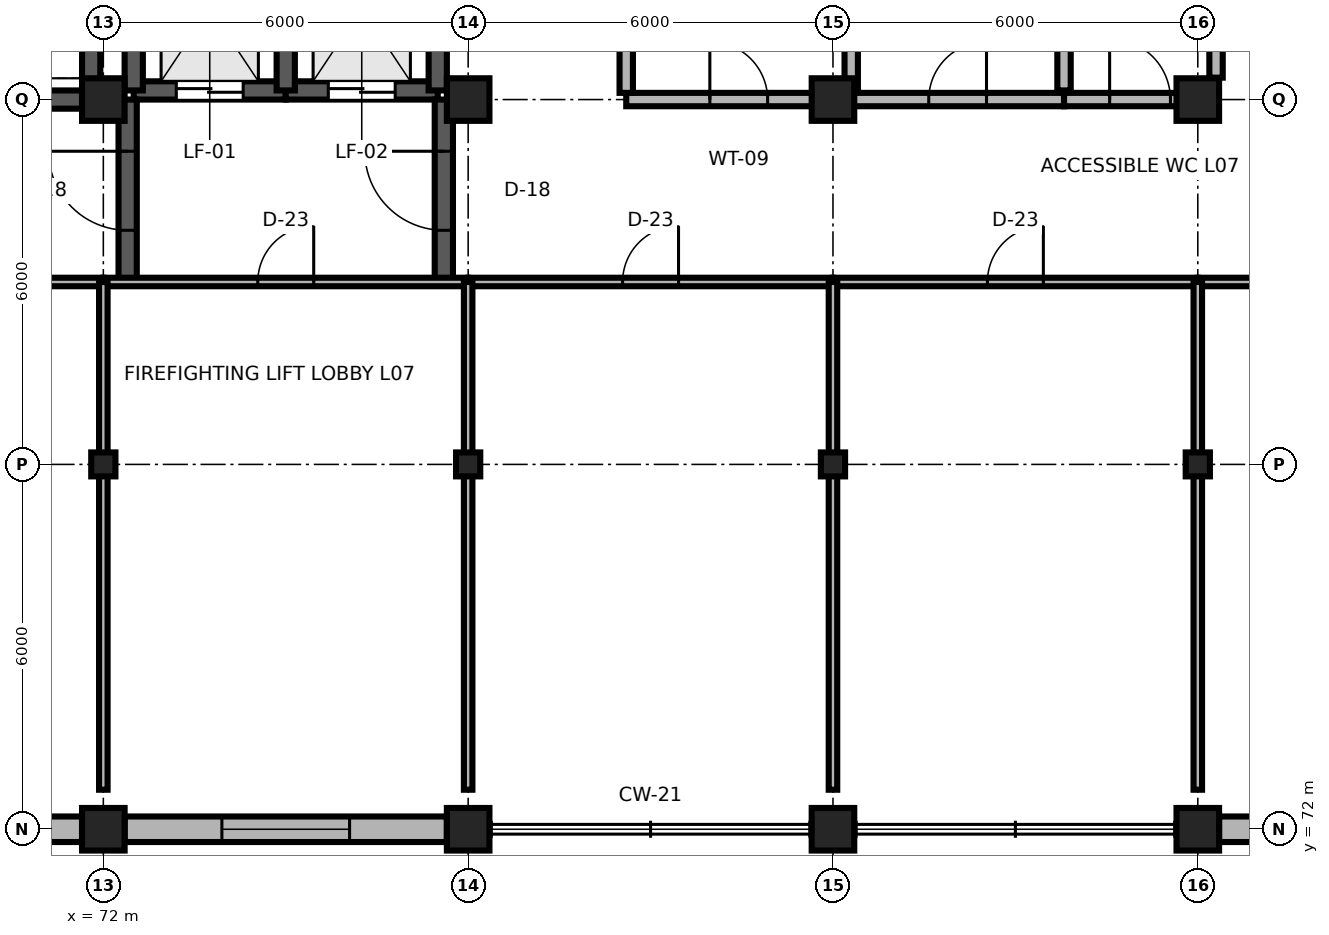
"""IFC4 building model, lengths in metres.
Left out: names, types, materials, properties, quantities, classifications, styles, units other than length and angle.
Written with IfcOpenShell. Run it as: python <this file> out.ifc"""

import sys

from ifc_helpers import new_model, si_unit, direction, frame, frame_2d, origin, origin_2d, place, context, subcontext, project, spatial, rectangle, i_section, extrude, element, fill, save


model = new_model("IFC4")
c1 = context("Model", 3, precision=1e-05, world=origin(), true_north=direction((0.0, 1.0)))
c2 = subcontext(c1, "Body", "Model", "MODEL_VIEW")
j1 = project(units=[si_unit("LENGTHUNIT", "METRE"), si_unit("PLANEANGLEUNIT", "RADIAN")], contexts=[c1])
p1 = place(None, origin())
s1 = spatial("IfcSite", under=j1, at=p1, CompositionType="ELEMENT")
p2 = place(p1, origin())
s2 = spatial("IfcBuilding", under=s1, at=p2, CompositionType="ELEMENT")
p3 = place(p2, frame((0.0, 0.0, 28.8)))
s3 = spatial("IfcBuildingStorey", under=s2, at=p3, CompositionType="ELEMENT", Elevation=28.8)
for number, where, z_axis, x_axis in (
    (1, (72.0, 72.0, 0.0), (0.0, 0.0, 1.0), (1.0, 0.0, 0.0)),
    (2, (78.0, 72.0, 0.0), (0.0, 0.0, 1.0), (1.0, 0.0, 0.0)),
    (3, (84.0, 72.0, 0.0), (0.0, 0.0, 1.0), (1.0, 0.0, 0.0)),
    (4, (90.0, 72.0, 0.0), (0.0, 0.0, 1.0), (1.0, 0.0, 0.0)),
):
    element("IfcColumn", number, at=place(p3, frame(where, z_axis=z_axis, x_axis=x_axis)), inside=s3, PredefinedType="COLUMN", context=c2, shape_type="SweptSolid", body=[
        extrude(rectangle(XDim=0.7, YDim=0.7, at=origin_2d()), origin(), (0.0, 0.0, 1.0), 3.9),
    ])
for number, where, z_axis, x_axis in (
    (5, (72.0, 78.0, 0.0), (0.0, 0.0, 1.0), (1.0, 0.0, 0.0)),
    (6, (78.0, 78.0, 0.0), (0.0, 0.0, 1.0), (1.0, 0.0, 0.0)),
    (7, (84.0, 78.0, 0.0), (0.0, 0.0, 1.0), (1.0, 0.0, 0.0)),
    (8, (90.0, 78.0, 0.0), (0.0, 0.0, 1.0), (1.0, 0.0, 0.0)),
):
    element("IfcColumn", number, at=place(p3, frame(where, z_axis=z_axis, x_axis=x_axis)), inside=s3, PredefinedType="COLUMN", context=c2, shape_type="SweptSolid", body=[
        extrude(i_section(OverallWidth=0.398, OverallDepth=0.394, WebThickness=0.011, FlangeThickness=0.018, FilletRadius=0.022, at=origin_2d()), origin(), (0.0, 0.0, 1.0), 3.9),
    ])
for number, where, z_axis, x_axis in (
    (9, (72.0, 84.0, 0.0), (0.0, 0.0, 1.0), (1.0, 0.0, 0.0)),
    (10, (78.0, 84.0, 0.0), (0.0, 0.0, 1.0), (1.0, 0.0, 0.0)),
    (11, (84.0, 84.0, 0.0), (0.0, 0.0, 1.0), (1.0, 0.0, 0.0)),
    (12, (90.0, 84.0, 0.0), (0.0, 0.0, 1.0), (1.0, 0.0, 0.0)),
):
    element("IfcColumn", number, at=place(p3, frame(where, z_axis=z_axis, x_axis=x_axis)), inside=s3, PredefinedType="COLUMN", context=c2, shape_type="SweptSolid", body=[
        extrude(rectangle(XDim=0.7, YDim=0.7, at=origin_2d()), origin(), (0.0, 0.0, 1.0), 3.9),
    ])
p4 = place(p3, frame((66.35, 72.0, 0.0), z_axis=(0.0, 0.0, 1.0), x_axis=(1.0, 0.0, 0.0)))
e13 = element("IfcWall", 13, at=p4, inside=s3, PredefinedType="SOLIDWALL", context=c2, shape_type="SweptSolid", body=[
    extrude(rectangle(XDim=5.3, YDim=0.42, at=frame_2d((2.65, 0.0))), origin(), (0.0, 0.0, 1.0), 3.32),
])
p5 = place(p4, frame((1.6, 0.0, 0.85)))
e14 = element("IfcOpeningElement", 14, at=p5, cuts=e13, PredefinedType="OPENING", context=c2, shape_type="SweptSolid", body=[
    extrude(rectangle(XDim=2.1, YDim=2.1, at=frame_2d((1.05, 1.05))), frame((0.0, 0.225, 0.0), z_axis=(0.0, -1.0, 0.0), x_axis=(1.0, 0.0, 0.0)), (0.0, 0.0, 1.0), 0.45),
])
p6 = place(p3, frame((72.35, 72.0, 0.0), z_axis=(0.0, 0.0, 1.0), x_axis=(1.0, 0.0, 0.0)))
e15 = element("IfcWall", 15, at=p6, inside=s3, PredefinedType="SOLIDWALL", context=c2, shape_type="SweptSolid", body=[
    extrude(rectangle(XDim=5.3, YDim=0.42, at=frame_2d((2.65, 0.0))), origin(), (0.0, 0.0, 1.0), 3.32),
])
p7 = place(p6, frame((1.6, 0.0, 0.85)))
e16 = element("IfcOpeningElement", 16, at=p7, cuts=e15, PredefinedType="OPENING", context=c2, shape_type="SweptSolid", body=[
    extrude(rectangle(XDim=2.1, YDim=2.1, at=frame_2d((1.05, 1.05))), frame((0.0, 0.225, 0.0), z_axis=(0.0, -1.0, 0.0), x_axis=(1.0, 0.0, 0.0)), (0.0, 0.0, 1.0), 0.45),
])
p8 = place(p3, frame((90.35, 72.0, 0.0), z_axis=(0.0, 0.0, 1.0), x_axis=(1.0, 0.0, 0.0)))
e17 = element("IfcWall", 17, at=p8, inside=s3, PredefinedType="SOLIDWALL", context=c2, shape_type="SweptSolid", body=[
    extrude(rectangle(XDim=5.3, YDim=0.42, at=frame_2d((2.65, 0.0))), origin(), (0.0, 0.0, 1.0), 3.32),
])
p9 = place(p8, frame((1.6, 0.0, 0.85)))
e18 = element("IfcOpeningElement", 18, at=p9, cuts=e17, PredefinedType="OPENING", context=c2, shape_type="SweptSolid", body=[
    extrude(rectangle(XDim=2.1, YDim=2.1, at=frame_2d((1.05, 1.05))), frame((0.0, 0.225, 0.0), z_axis=(0.0, -1.0, 0.0), x_axis=(1.0, 0.0, 0.0)), (0.0, 0.0, 1.0), 0.45),
])
p10 = place(p3, frame((66.35, 84.0, 0.0), z_axis=(0.0, 0.0, 1.0), x_axis=(1.0, 0.0, 0.0)))
e19 = element("IfcWall", 19, at=p10, inside=s3, PredefinedType="SHEAR", context=c2, shape_type="SweptSolid", body=[
    extrude(rectangle(XDim=5.3, YDim=0.3, at=frame_2d((2.65, 0.0))), origin(), (0.0, 0.0, 1.0), 3.66),
])
p11 = place(p10, frame((1.975, 0.0, 0.0)))
e20 = element("IfcOpeningElement", 20, at=p11, cuts=e19, PredefinedType="OPENING", context=c2, shape_type="SweptSolid", body=[
    extrude(rectangle(XDim=1.35, YDim=2.2, at=frame_2d((0.675, 1.1))), frame((0.0, 0.165, 0.0), z_axis=(0.0, -1.0, 0.0), x_axis=(1.0, 0.0, 0.0)), (0.0, 0.0, 1.0), 0.33),
])
p12 = place(p3, frame((71.8, 84.0, 0.0), z_axis=(0.0, 0.0, 1.0), x_axis=(0.0, 1.0, 0.0)))
e21 = element("IfcWall", 21, at=p12, inside=s3, PredefinedType="SHEAR", context=c2, shape_type="SweptSolid", body=[
    extrude(rectangle(XDim=11.8, YDim=0.3, at=frame_2d((5.9, 0.0))), origin(), (0.0, 0.0, 1.0), 3.74),
])
p13 = place(p3, frame((72.5, 84.15, 0.0), z_axis=(0.0, 0.0, 1.0), x_axis=(1.0, 0.0, 0.0)))
e22 = element("IfcWall", 22, at=p13, inside=s3, PredefinedType="SHEAR", context=c2, shape_type="SweptSolid", body=[
    extrude(rectangle(XDim=2.5, YDim=0.3, at=frame_2d((1.25, 0.0))), origin(), (0.0, 0.0, 1.0), 3.74),
])
p14 = place(p13, frame((0.7, 0.0, 0.0)))
e23 = element("IfcOpeningElement", 23, at=p14, cuts=e22, PredefinedType="OPENING", context=c2, shape_type="SweptSolid", body=[
    extrude(rectangle(XDim=1.1, YDim=2.1, at=frame_2d((0.55, 1.05))), frame((0.0, 0.165, 0.0), z_axis=(0.0, -1.0, 0.0), x_axis=(1.0, 0.0, 0.0)), (0.0, 0.0, 1.0), 0.33),
])
p15 = place(p3, frame((72.5, 84.15, 0.0), z_axis=(0.0, 0.0, 1.0), x_axis=(0.0, 1.0, 0.0)))
e24 = element("IfcWall", 24, at=p15, inside=s3, PredefinedType="SHEAR", context=c2, shape_type="SweptSolid", body=[
    extrude(rectangle(XDim=3.4, YDim=0.3, at=frame_2d((1.7, 0.0))), origin(), (0.0, 0.0, 1.0), 3.74),
])
p16 = place(p3, frame((75.0, 84.15, 0.0), z_axis=(0.0, 0.0, 1.0), x_axis=(1.0, 0.0, 0.0)))
e25 = element("IfcWall", 25, at=p16, inside=s3, PredefinedType="SHEAR", context=c2, shape_type="SweptSolid", body=[
    extrude(rectangle(XDim=2.5, YDim=0.3, at=frame_2d((1.25, 0.0))), origin(), (0.0, 0.0, 1.0), 3.74),
])
p17 = place(p16, frame((0.7, 0.0, 0.0)))
e26 = element("IfcOpeningElement", 26, at=p17, cuts=e25, PredefinedType="OPENING", context=c2, shape_type="SweptSolid", body=[
    extrude(rectangle(XDim=1.1, YDim=2.1, at=frame_2d((0.55, 1.05))), frame((0.0, 0.165, 0.0), z_axis=(0.0, -1.0, 0.0), x_axis=(1.0, 0.0, 0.0)), (0.0, 0.0, 1.0), 0.33),
])
for number, where, z_axis, x_axis in (
    (27, (75.0, 84.15, 0.0), (0.0, 0.0, 1.0), (0.0, 1.0, 0.0)),
    (28, (77.5, 84.15, 0.0), (0.0, 0.0, 1.0), (0.0, 1.0, 0.0)),
):
    element("IfcWall", number, at=place(p3, frame(where, z_axis=z_axis, x_axis=x_axis)), inside=s3, PredefinedType="SHEAR", context=c2, shape_type="SweptSolid", body=[
        extrude(rectangle(XDim=3.4, YDim=0.3, at=frame_2d((1.7, 0.0))), origin(), (0.0, 0.0, 1.0), 3.74),
    ])
p18 = place(p3, frame((72.4, 81.0, 0.0), z_axis=(0.0, 0.0, 1.0), x_axis=(0.0, 1.0, 0.0)))
e29 = element("IfcWall", 29, at=p18, inside=s3, PredefinedType="SHEAR", context=c2, shape_type="SweptSolid", body=[
    extrude(rectangle(XDim=3.0, YDim=0.3, at=frame_2d((1.5, 0.0))), origin(), (0.0, 0.0, 1.0), 3.74),
])
p19 = place(p18, frame((0.85, 0.0, 0.0)))
e30 = element("IfcOpeningElement", 30, at=p19, cuts=e29, PredefinedType="OPENING", context=c2, shape_type="SweptSolid", body=[
    extrude(rectangle(XDim=1.3, YDim=2.2, at=frame_2d((0.65, 1.1))), frame((0.0, 0.165, 0.0), z_axis=(0.0, -1.0, 0.0), x_axis=(1.0, 0.0, 0.0)), (0.0, 0.0, 1.0), 0.33),
])
p20 = place(p3, frame((77.6, 81.0, 0.0), z_axis=(0.0, 0.0, 1.0), x_axis=(0.0, 1.0, 0.0)))
e31 = element("IfcWall", 31, at=p20, inside=s3, PredefinedType="SHEAR", context=c2, shape_type="SweptSolid", body=[
    extrude(rectangle(XDim=3.0, YDim=0.3, at=frame_2d((1.5, 0.0))), origin(), (0.0, 0.0, 1.0), 3.74),
])
p21 = place(p20, frame((0.85, 0.0, 0.0)))
e32 = element("IfcOpeningElement", 32, at=p21, cuts=e31, PredefinedType="OPENING", context=c2, shape_type="SweptSolid", body=[
    extrude(rectangle(XDim=1.3, YDim=2.2, at=frame_2d((0.65, 1.1))), frame((0.0, 0.165, 0.0), z_axis=(0.0, -1.0, 0.0), x_axis=(1.0, 0.0, 0.0)), (0.0, 0.0, 1.0), 0.33),
])
p22 = place(p3, frame((80.6, 84.0, 0.0), z_axis=(0.0, 0.0, 1.0), x_axis=(1.0, 0.0, 0.0)))
e33 = element("IfcWall", 33, at=p22, inside=s3, PredefinedType="PARTITIONING", context=c2, shape_type="SweptSolid", body=[
    extrude(rectangle(XDim=3.7, YDim=0.22, at=frame_2d((1.85, 0.0))), origin(), (0.0, 0.0, 1.0), 3.352),
])
p23 = place(p22, frame((1.375, 0.0, 0.0)))
e34 = element("IfcOpeningElement", 34, at=p23, cuts=e33, PredefinedType="OPENING", context=c2, shape_type="SweptSolid", body=[
    extrude(rectangle(XDim=0.95, YDim=2.15, at=frame_2d((0.475, 1.075))), frame((0.0, 0.125, 0.0), z_axis=(0.0, -1.0, 0.0), x_axis=(1.0, 0.0, 0.0)), (0.0, 0.0, 1.0), 0.25),
])
p24 = place(p3, frame((84.3, 84.0, 0.0), z_axis=(0.0, 0.0, 1.0), x_axis=(1.0, 0.0, 0.0)))
e35 = element("IfcWall", 35, at=p24, inside=s3, PredefinedType="PARTITIONING", context=c2, shape_type="SweptSolid", body=[
    extrude(rectangle(XDim=3.5, YDim=0.22, at=frame_2d((1.75, 0.0))), origin(), (0.0, 0.0, 1.0), 3.352),
])
p25 = place(p24, frame((1.275, 0.0, 0.0)))
e36 = element("IfcOpeningElement", 36, at=p25, cuts=e35, PredefinedType="OPENING", context=c2, shape_type="SweptSolid", body=[
    extrude(rectangle(XDim=0.95, YDim=2.1, at=frame_2d((0.475, 1.05))), frame((0.0, 0.125, 0.0), z_axis=(0.0, -1.0, 0.0), x_axis=(1.0, 0.0, 0.0)), (0.0, 0.0, 1.0), 0.25),
])
p26 = place(p3, frame((87.8, 84.0, 0.0), z_axis=(0.0, 0.0, 1.0), x_axis=(1.0, 0.0, 0.0)))
e37 = element("IfcWall", 37, at=p26, inside=s3, PredefinedType="PARTITIONING", context=c2, shape_type="SweptSolid", body=[
    extrude(rectangle(XDim=2.5, YDim=0.22, at=frame_2d((1.25, 0.0))), origin(), (0.0, 0.0, 1.0), 3.352),
])
p27 = place(p26, frame((0.75, 0.0, 0.0)))
e38 = element("IfcOpeningElement", 38, at=p27, cuts=e37, PredefinedType="OPENING", context=c2, shape_type="SweptSolid", body=[
    extrude(rectangle(XDim=1.0, YDim=2.15, at=frame_2d((0.5, 1.075))), frame((0.0, 0.125, 0.0), z_axis=(0.0, -1.0, 0.0), x_axis=(1.0, 0.0, 0.0)), (0.0, 0.0, 1.0), 0.25),
])
for number, where, z_axis, x_axis in (
    (39, (84.3, 84.15, 0.0), (0.0, 0.0, 1.0), (0.0, 1.0, 0.0)),
    (40, (87.8, 84.15, 0.0), (0.0, 0.0, 1.0), (0.0, 1.0, 0.0)),
):
    element("IfcWall", number, at=place(p3, frame(where, z_axis=z_axis, x_axis=x_axis)), inside=s3, PredefinedType="PARTITIONING", context=c2, shape_type="SweptSolid", body=[
        extrude(rectangle(XDim=5.0, YDim=0.22, at=frame_2d((2.5, 0.0))), origin(), (0.0, 0.0, 1.0), 3.74),
    ])
p28 = place(p3, frame((66.0, 81.0, 0.0), z_axis=(0.0, 0.0, 1.0), x_axis=(1.0, 0.0, 0.0)))
e41 = element("IfcWall", 41, at=p28, inside=s3, PredefinedType="PARTITIONING", context=c2, shape_type="SweptSolid", body=[
    extrude(rectangle(XDim=6.0, YDim=0.14, at=frame_2d((3.0, 0.0))), origin(), (0.0, 0.0, 1.0), 3.74),
])
p29 = place(p28, frame((2.54, 0.0, 0.0)))
e42 = element("IfcOpeningElement", 42, at=p29, cuts=e41, PredefinedType="OPENING", context=c2, shape_type="SweptSolid", body=[
    extrude(rectangle(XDim=0.92, YDim=2.15, at=frame_2d((0.46, 1.075))), frame((0.0, 0.085, 0.0), z_axis=(0.0, -1.0, 0.0), x_axis=(1.0, 0.0, 0.0)), (0.0, 0.0, 1.0), 0.17),
])
p30 = place(p3, frame((72.0, 81.0, 0.0), z_axis=(0.0, 0.0, 1.0), x_axis=(1.0, 0.0, 0.0)))
e43 = element("IfcWall", 43, at=p30, inside=s3, PredefinedType="PARTITIONING", context=c2, shape_type="SweptSolid", body=[
    extrude(rectangle(XDim=6.0, YDim=0.14, at=frame_2d((3.0, 0.0))), origin(), (0.0, 0.0, 1.0), 3.74),
])
p31 = place(p30, frame((2.54, 0.0, 0.0)))
e44 = element("IfcOpeningElement", 44, at=p31, cuts=e43, PredefinedType="OPENING", context=c2, shape_type="SweptSolid", body=[
    extrude(rectangle(XDim=0.92, YDim=2.15, at=frame_2d((0.46, 1.075))), frame((0.0, 0.085, 0.0), z_axis=(0.0, -1.0, 0.0), x_axis=(1.0, 0.0, 0.0)), (0.0, 0.0, 1.0), 0.17),
])
p32 = place(p3, frame((78.0, 81.0, 0.0), z_axis=(0.0, 0.0, 1.0), x_axis=(1.0, 0.0, 0.0)))
e45 = element("IfcWall", 45, at=p32, inside=s3, PredefinedType="PARTITIONING", context=c2, shape_type="SweptSolid", body=[
    extrude(rectangle(XDim=6.0, YDim=0.14, at=frame_2d((3.0, 0.0))), origin(), (0.0, 0.0, 1.0), 3.74),
])
p33 = place(p32, frame((2.54, 0.0, 0.0)))
e46 = element("IfcOpeningElement", 46, at=p33, cuts=e45, PredefinedType="OPENING", context=c2, shape_type="SweptSolid", body=[
    extrude(rectangle(XDim=0.92, YDim=2.15, at=frame_2d((0.46, 1.075))), frame((0.0, 0.085, 0.0), z_axis=(0.0, -1.0, 0.0), x_axis=(1.0, 0.0, 0.0)), (0.0, 0.0, 1.0), 0.17),
])
p34 = place(p3, frame((84.0, 81.0, 0.0), z_axis=(0.0, 0.0, 1.0), x_axis=(1.0, 0.0, 0.0)))
e47 = element("IfcWall", 47, at=p34, inside=s3, PredefinedType="PARTITIONING", context=c2, shape_type="SweptSolid", body=[
    extrude(rectangle(XDim=6.0, YDim=0.14, at=frame_2d((3.0, 0.0))), origin(), (0.0, 0.0, 1.0), 3.74),
])
p35 = place(p34, frame((2.54, 0.0, 0.0)))
e48 = element("IfcOpeningElement", 48, at=p35, cuts=e47, PredefinedType="OPENING", context=c2, shape_type="SweptSolid", body=[
    extrude(rectangle(XDim=0.92, YDim=2.15, at=frame_2d((0.46, 1.075))), frame((0.0, 0.085, 0.0), z_axis=(0.0, -1.0, 0.0), x_axis=(1.0, 0.0, 0.0)), (0.0, 0.0, 1.0), 0.17),
])
p36 = place(p3, frame((90.0, 81.0, 0.0), z_axis=(0.0, 0.0, 1.0), x_axis=(1.0, 0.0, 0.0)))
e49 = element("IfcWall", 49, at=p36, inside=s3, PredefinedType="PARTITIONING", context=c2, shape_type="SweptSolid", body=[
    extrude(rectangle(XDim=6.0, YDim=0.14, at=frame_2d((3.0, 0.0))), origin(), (0.0, 0.0, 1.0), 3.74),
])
p37 = place(p36, frame((2.54, 0.0, 0.0)))
e50 = element("IfcOpeningElement", 50, at=p37, cuts=e49, PredefinedType="OPENING", context=c2, shape_type="SweptSolid", body=[
    extrude(rectangle(XDim=0.92, YDim=2.15, at=frame_2d((0.46, 1.075))), frame((0.0, 0.085, 0.0), z_axis=(0.0, -1.0, 0.0), x_axis=(1.0, 0.0, 0.0)), (0.0, 0.0, 1.0), 0.17),
])
for number, where, z_axis, x_axis in (
    (51, (72.0, 72.65, 0.0), (0.0, 0.0, 1.0), (0.0, 1.0, 0.0)),
    (52, (78.0, 72.65, 0.0), (0.0, 0.0, 1.0), (0.0, 1.0, 0.0)),
    (53, (84.0, 72.65, 0.0), (0.0, 0.0, 1.0), (0.0, 1.0, 0.0)),
    (54, (90.0, 72.65, 0.0), (0.0, 0.0, 1.0), (0.0, 1.0, 0.0)),
):
    element("IfcWall", number, at=place(p3, frame(where, z_axis=z_axis, x_axis=x_axis)), inside=s3, PredefinedType="PARTITIONING", context=c2, shape_type="SweptSolid", body=[
        extrude(rectangle(XDim=8.35, YDim=0.14, at=frame_2d((4.175, 0.0))), origin(), (0.0, 0.0, 1.0), 3.352),
    ])
p38 = place(p3, frame((80.6, 84.11, 0.0), z_axis=(0.0, 0.0, 1.0), x_axis=(0.0, 1.0, 0.0)))
e55 = element("IfcWall", 55, at=p38, inside=s3, PredefinedType="PARTITIONING", context=c2, shape_type="SweptSolid", body=[
    extrude(rectangle(XDim=4.98, YDim=0.22, at=frame_2d((2.49, 0.0))), origin(), (0.0, 0.0, 1.0), 3.74),
])
p39 = place(p3, frame((90.3, 84.36, 0.0), z_axis=(0.0, 0.0, 1.0), x_axis=(0.0, 1.0, 0.0)))
e56 = element("IfcWall", 56, at=p39, inside=s3, PredefinedType="PARTITIONING", context=c2, shape_type="SweptSolid", body=[
    extrude(rectangle(XDim=4.73, YDim=0.22, at=frame_2d((2.365, 0.0))), origin(), (0.0, 0.0, 1.0), 3.74),
])
p40 = place(p7, origin())
e57 = element("IfcWindow", 57, at=p40, inside=s3, PartitioningType="SINGLE_PANEL", PredefinedType="WINDOW", context=c2, shape_type="SweptSolid", body=[
    extrude(rectangle(XDim=2.1, YDim=2.1, at=frame_2d((1.05, 1.05))), frame((0.0, 0.03, 0.0), z_axis=(0.0, -1.0, 0.0), x_axis=(1.0, 0.0, 0.0)), (0.0, 0.0, 1.0), 0.06),
])
fill(e16, e57)
p41 = place(p14, origin())
e58 = element("IfcDoor", 58, at=p41, inside=s3, OperationType="DOUBLE_DOOR_SLIDING", PredefinedType="DOOR", context=c2, shape_type="SweptSolid", body=[
    extrude(rectangle(XDim=1.1, YDim=2.1, at=frame_2d((0.55, 1.05))), frame((0.0, 0.025, 0.0), z_axis=(0.0, -1.0, 0.0), x_axis=(1.0, 0.0, 0.0)), (0.0, 0.0, 1.0), 0.05),
])
fill(e23, e58)
p42 = place(p17, origin())
e59 = element("IfcDoor", 59, at=p42, inside=s3, OperationType="DOUBLE_DOOR_SLIDING", PredefinedType="DOOR", context=c2, shape_type="SweptSolid", body=[
    extrude(rectangle(XDim=1.1, YDim=2.1, at=frame_2d((0.55, 1.05))), frame((0.0, 0.025, 0.0), z_axis=(0.0, -1.0, 0.0), x_axis=(1.0, 0.0, 0.0)), (0.0, 0.0, 1.0), 0.05),
])
fill(e26, e59)
p43 = place(p19, origin())
e60 = element("IfcDoor", 60, at=p43, inside=s3, OperationType="SINGLE_SWING_RIGHT", PredefinedType="DOOR", context=c2, shape_type="SweptSolid", body=[
    extrude(rectangle(XDim=1.3, YDim=2.2, at=frame_2d((0.65, 1.1))), frame((0.0, 0.025, 0.0), z_axis=(0.0, -1.0, 0.0), x_axis=(1.0, 0.0, 0.0)), (0.0, 0.0, 1.0), 0.05),
])
fill(e30, e60)
p44 = place(p21, origin())
e61 = element("IfcDoor", 61, at=p44, inside=s3, OperationType="SINGLE_SWING_RIGHT", PredefinedType="DOOR", context=c2, shape_type="SweptSolid", body=[
    extrude(rectangle(XDim=1.3, YDim=2.2, at=frame_2d((0.65, 1.1))), frame((0.0, 0.025, 0.0), z_axis=(0.0, -1.0, 0.0), x_axis=(1.0, 0.0, 0.0)), (0.0, 0.0, 1.0), 0.05),
])
fill(e32, e61)
p45 = place(p23, origin())
e62 = element("IfcDoor", 62, at=p45, inside=s3, OperationType="SINGLE_SWING_LEFT", PredefinedType="DOOR", context=c2, shape_type="SweptSolid", body=[
    extrude(rectangle(XDim=0.95, YDim=2.15, at=frame_2d((0.475, 1.075))), frame((0.0, 0.025, 0.0), z_axis=(0.0, -1.0, 0.0), x_axis=(1.0, 0.0, 0.0)), (0.0, 0.0, 1.0), 0.05),
])
fill(e34, e62)
p46 = place(p25, origin())
e63 = element("IfcDoor", 63, at=p46, inside=s3, OperationType="SINGLE_SWING_RIGHT", PredefinedType="DOOR", context=c2, shape_type="SweptSolid", body=[
    extrude(rectangle(XDim=0.95, YDim=2.1, at=frame_2d((0.475, 1.05))), frame((0.0, 0.025, 0.0), z_axis=(0.0, -1.0, 0.0), x_axis=(1.0, 0.0, 0.0)), (0.0, 0.0, 1.0), 0.05),
])
fill(e36, e63)
p47 = place(p27, origin())
e64 = element("IfcDoor", 64, at=p47, inside=s3, OperationType="SINGLE_SWING_LEFT", PredefinedType="DOOR", context=c2, shape_type="SweptSolid", body=[
    extrude(rectangle(XDim=1.0, YDim=2.15, at=frame_2d((0.5, 1.075))), frame((0.0, 0.025, 0.0), z_axis=(0.0, -1.0, 0.0), x_axis=(1.0, 0.0, 0.0)), (0.0, 0.0, 1.0), 0.05),
])
fill(e38, e64)
p48 = place(p31, origin())
e65 = element("IfcDoor", 65, at=p48, inside=s3, OperationType="SINGLE_SWING_RIGHT", PredefinedType="DOOR", context=c2, shape_type="SweptSolid", body=[
    extrude(rectangle(XDim=0.92, YDim=2.15, at=frame_2d((0.46, 1.075))), frame((0.0, 0.025, 0.0), z_axis=(0.0, -1.0, 0.0), x_axis=(1.0, 0.0, 0.0)), (0.0, 0.0, 1.0), 0.05),
])
fill(e44, e65)
p49 = place(p33, origin())
e66 = element("IfcDoor", 66, at=p49, inside=s3, OperationType="SINGLE_SWING_RIGHT", PredefinedType="DOOR", context=c2, shape_type="SweptSolid", body=[
    extrude(rectangle(XDim=0.92, YDim=2.15, at=frame_2d((0.46, 1.075))), frame((0.0, 0.025, 0.0), z_axis=(0.0, -1.0, 0.0), x_axis=(1.0, 0.0, 0.0)), (0.0, 0.0, 1.0), 0.05),
])
fill(e46, e66)
p50 = place(p35, origin())
e67 = element("IfcDoor", 67, at=p50, inside=s3, OperationType="SINGLE_SWING_RIGHT", PredefinedType="DOOR", context=c2, shape_type="SweptSolid", body=[
    extrude(rectangle(XDim=0.92, YDim=2.15, at=frame_2d((0.46, 1.075))), frame((0.0, 0.025, 0.0), z_axis=(0.0, -1.0, 0.0), x_axis=(1.0, 0.0, 0.0)), (0.0, 0.0, 1.0), 0.05),
])
fill(e48, e67)
save(model, sys.argv[1])
